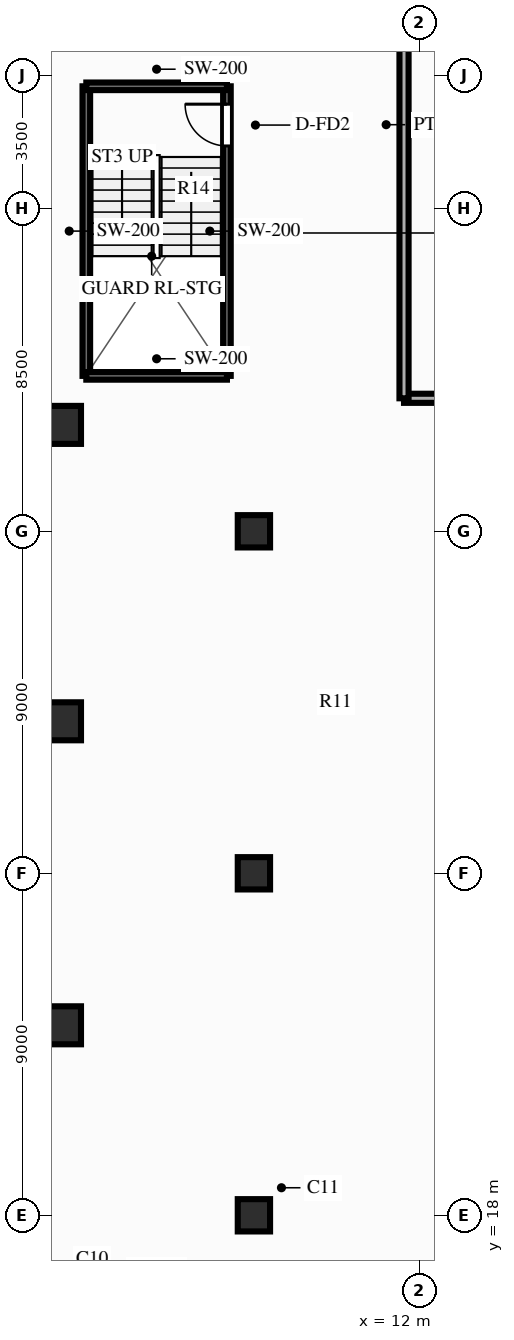
"""IFC4 building model, lengths in metres.
Left out: names, types, materials, properties, quantities, classifications, styles, units other than length and angle.
Written with IfcOpenShell. Run it as: python <this file> out.ifc"""

import sys

from ifc_helpers import new_model, si_unit, direction, frame, frame_2d, origin, origin_2d, place, context, subcontext, project, spatial, rectangle, circle, extrude, source, transform, mapped, element, fill, save


model = new_model("IFC4")
c1 = context("Model", 3, precision=1e-05, world=origin(), true_north=direction((0.0, 1.0)))
c2 = subcontext(c1, "Body", "Model", "MODEL_VIEW")
j1 = project(units=[si_unit("LENGTHUNIT", "METRE"), si_unit("PLANEANGLEUNIT", "RADIAN")], contexts=[c1])
p1 = place(None, origin())
s1 = spatial("IfcSite", under=j1, at=p1, CompositionType="ELEMENT")
p2 = place(p1, origin())
s2 = spatial("IfcBuilding", under=s1, at=p2, CompositionType="ELEMENT")
p3 = place(p2, frame((0.0, 0.0, 7.8)))
s3 = spatial("IfcBuildingStorey", under=s2, at=p3, CompositionType="ELEMENT", Elevation=7.8)
m1 = source(origin(), c2, "Body", "SweptSolid", [
    extrude(circle(Radius=0.5, at=origin_2d()), origin(), (0.0, 0.0, 1.0), 3.6),
])
for number, where, z_axis, x_axis in (
    (1, (2.6, 23.0, 0.0), (0.0, 0.0, 1.0), (1.0, 0.0, 0.0)),
    (2, (2.6, 31.0, 0.0), (0.0, 0.0, 1.0), (1.0, 0.0, 0.0)),
    (3, (2.6, 38.8, 0.0), (0.0, 0.0, 1.0), (1.0, 0.0, 0.0)),
):
    element("IfcColumn", number, at=place(p3, frame(where, z_axis=z_axis, x_axis=x_axis)), inside=s3, PredefinedType="COLUMN", context=c2, shape_type="MappedRepresentation", body=[
        mapped(m1, transform((0.0, 0.0, 0.0), scale=1.0)),
    ])
m2 = source(origin(), c2, "Body", "SweptSolid", [
    extrude(circle(Radius=0.425, at=origin_2d()), origin(), (0.0, 0.0, 1.0), 3.6),
])
for number, where, z_axis, x_axis in (
    (4, (7.65, 18.0, 0.0), (0.0, 0.0, 1.0), (1.0, 0.0, 0.0)),
    (5, (7.65, 27.0, 0.0), (0.0, 0.0, 1.0), (1.0, 0.0, 0.0)),
    (6, (7.65, 36.0, 0.0), (0.0, 0.0, 1.0), (1.0, 0.0, 0.0)),
):
    element("IfcColumn", number, at=place(p3, frame(where, z_axis=z_axis, x_axis=x_axis)), inside=s3, PredefinedType="COLUMN", context=c2, shape_type="MappedRepresentation", body=[
        mapped(m2, transform((0.0, 0.0, 0.0), scale=1.0)),
    ])
p4 = place(p3, frame((3.24, 40.09, 0.0), z_axis=(0.0, 0.0, 1.0), x_axis=(0.0, 1.0, 0.0)))
e7 = element("IfcWall", 7, at=p4, inside=s3, PredefinedType="SOLIDWALL", context=c2, shape_type="SweptSolid", body=[
    extrude(rectangle(XDim=7.62, YDim=0.2, at=frame_2d((3.81, 0.0))), origin(), (0.0, 0.0, 1.0), 3.32),
])
p5 = place(p3, frame((6.94, 40.09, 0.0), z_axis=(0.0, 0.0, 1.0), x_axis=(0.0, 1.0, 0.0)))
e8 = element("IfcWall", 8, at=p5, inside=s3, PredefinedType="SOLIDWALL", context=c2, shape_type="SweptSolid", body=[
    extrude(rectangle(XDim=7.62, YDim=0.2, at=frame_2d((3.81, 0.0))), origin(), (0.0, 0.0, 1.0), 3.32),
])
p6 = place(p5, frame((7.15, 0.0, 0.0), z_axis=(0.0, 0.0, 1.0), x_axis=(-1.0, 0.0, 0.0)))
e9 = element("IfcOpeningElement", 9, at=p6, cuts=e8, PredefinedType="OPENING", context=c2, shape_type="SweptSolid", body=[
    extrude(rectangle(XDim=1.1, YDim=2.15, at=frame_2d((0.55, 1.075))), frame((0.0, 0.112, 0.0), z_axis=(0.0, -1.0, 0.0), x_axis=(1.0, 0.0, 0.0)), (0.0, 0.0, 1.0), 0.224),
])
for number, where, z_axis, x_axis in (
    (10, (3.24, 40.09, 0.0), (0.0, 0.0, 1.0), (1.0, 0.0, 0.0)),
    (11, (3.24, 47.71, 0.0), (0.0, 0.0, 1.0), (1.0, 0.0, 0.0)),
):
    element("IfcWall", number, at=place(p3, frame(where, z_axis=z_axis, x_axis=x_axis)), inside=s3, PredefinedType="SOLIDWALL", context=c2, shape_type="SweptSolid", body=[
        extrude(rectangle(XDim=3.7, YDim=0.2, at=frame_2d((1.85, 0.0))), origin(), (0.0, 0.0, 1.0), 3.32),
    ])
p7 = place(p3, frame((11.6, 39.5, 0.0), z_axis=(0.0, 0.0, 1.0), x_axis=(1.0, 0.0, 0.0)))
e12 = element("IfcWall", 12, at=p7, inside=s3, PredefinedType="PARTITIONING", context=c2, shape_type="SweptSolid", body=[
    extrude(rectangle(XDim=29.4, YDim=0.24, at=frame_2d((14.7, 0.0))), origin(), (0.0, 0.0, 1.0), 3.32),
])
p8 = place(p7, frame((14.933, 0.0, 0.0)))
e13 = element("IfcOpeningElement", 13, at=p8, cuts=e12, PredefinedType="OPENING", context=c2, shape_type="SweptSolid", body=[
    extrude(rectangle(XDim=1.25, YDim=2.15, at=frame_2d((0.625, 1.075))), frame((0.0, 0.132, 0.0), z_axis=(0.0, -1.0, 0.0), x_axis=(1.0, 0.0, 0.0)), (0.0, 0.0, 1.0), 0.264),
])
p9 = place(p3, frame((11.6, 39.5, 0.0), z_axis=(0.0, 0.0, 1.0), x_axis=(0.0, 1.0, 0.0)))
e14 = element("IfcWall", 14, at=p9, inside=s3, PredefinedType="PARTITIONING", context=c2, shape_type="SweptSolid", body=[
    extrude(rectangle(XDim=14.4, YDim=0.24, at=frame_2d((7.2, 0.0))), origin(), (0.0, 0.0, 1.0), 3.32),
])
m3 = source(origin(), c2, "Body", "SweptSolid", [
    extrude(rectangle(XDim=1.1, YDim=2.15, at=frame_2d((0.55, 1.075))), frame((0.0, 0.025, 0.0), z_axis=(0.0, -1.0, 0.0), x_axis=(1.0, 0.0, 0.0)), (0.0, 0.0, 1.0), 0.05),
])
p10 = place(p6, origin())
e15 = element("IfcDoor", 15, at=p10, inside=s3, OperationType="SINGLE_SWING_LEFT", PredefinedType="DOOR", context=c2, shape_type="MappedRepresentation", body=[
    mapped(m3, transform((0.0, 0.0, 0.0), scale=1.0)),
])
fill(e9, e15)
save(model, sys.argv[1])
